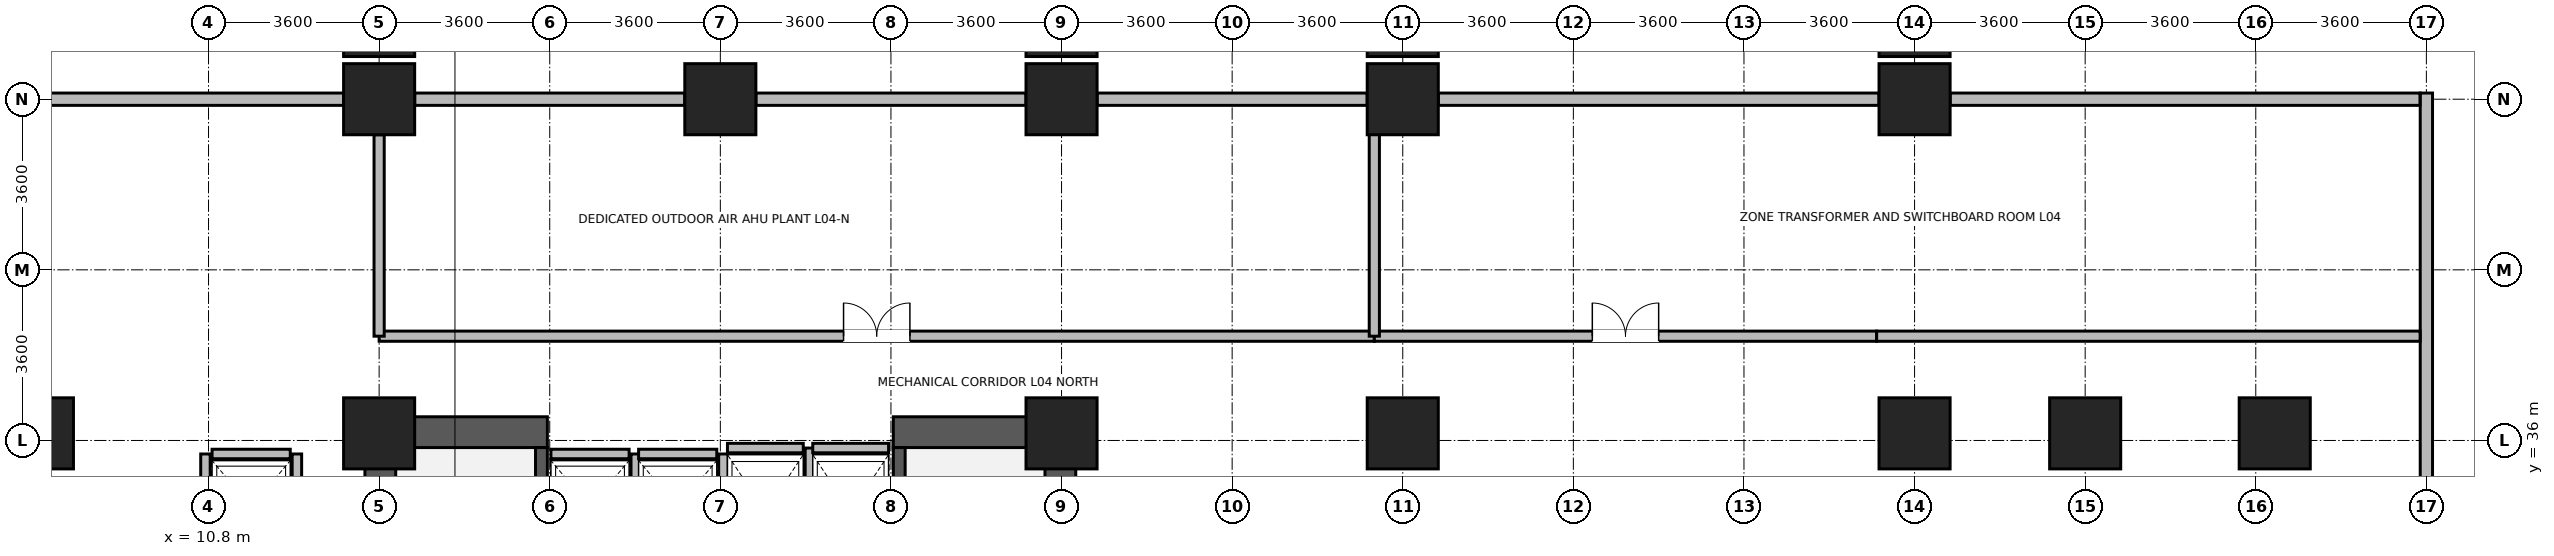
"""IFC4 building model, lengths in metres.
Left out: names, types, materials, properties, quantities, classifications, styles, units other than length and angle.
Written with IfcOpenShell. Run it as: python <this file> out.ifc"""

import sys

from ifc_helpers import new_model, si_unit, direction, frame, frame_2d, origin, origin_2d, place, context, subcontext, project, spatial, rectangle, extrude, source, transform, mapped, element, fill, save


model = new_model("IFC4")
c1 = context("Model", 3, precision=1e-05, world=origin(), true_north=direction((0.0, 1.0)))
c2 = subcontext(c1, "Body", "Model", "MODEL_VIEW")
j1 = project(units=[si_unit("LENGTHUNIT", "METRE"), si_unit("PLANEANGLEUNIT", "RADIAN")], contexts=[c1])
p1 = place(None, origin())
s1 = spatial("IfcSite", under=j1, at=p1, CompositionType="ELEMENT")
p2 = place(p1, origin())
s2 = spatial("IfcBuilding", under=s1, at=p2, CompositionType="ELEMENT")
p3 = place(p2, frame((0.0, 0.0, 19.8)))
s3 = spatial("IfcBuildingStorey", under=s2, at=p3, CompositionType="ELEMENT", Elevation=19.8)
for number, where, z_axis, x_axis in (
    (1, (14.425, 28.2, 0.0), (0.0, 0.0, 1.0), (0.0, 1.0, 0.0)),
    (2, (28.775, 28.2, 0.0), (0.0, 0.0, 1.0), (0.0, 1.0, 0.0)),
):
    element("IfcWall", number, at=place(p3, frame(where, z_axis=z_axis, x_axis=x_axis)), inside=s3, PredefinedType="SHEAR", context=c2, shape_type="SweptSolid", body=[
        extrude(rectangle(XDim=8.3, YDim=0.65, at=frame_2d((4.15, 0.0))), origin(), (0.0, 0.0, 1.0), 5.08),
    ])
for number, where, z_axis, x_axis in (
    (3, (14.75, 36.175, 0.0), (0.0, 0.0, 1.0), (1.0, 0.0, 0.0)),
    (4, (25.25, 36.175, 0.0), (0.0, 0.0, 1.0), (1.0, 0.0, 0.0)),
):
    element("IfcWall", number, at=place(p3, frame(where, z_axis=z_axis, x_axis=x_axis)), inside=s3, PredefinedType="SHEAR", context=c2, shape_type="SweptSolid", body=[
        extrude(rectangle(XDim=3.2, YDim=0.65, at=frame_2d((1.6, 0.0))), origin(), (0.0, 0.0, 1.0), 5.08),
    ])
p4 = place(p3, frame((17.825, 28.85, 0.0), z_axis=(0.0, 0.0, 1.0), x_axis=(0.0, 1.0, 0.0)))
e5 = element("IfcWall", 5, at=p4, inside=s3, PredefinedType="SHEAR", context=c2, shape_type="SweptSolid", body=[
    extrude(rectangle(XDim=7.0, YDim=0.25, at=frame_2d((3.5, 0.0))), origin(), (0.0, 0.0, 1.0), 5.08),
])
p5 = place(p4, frame((0.15, 0.0, 0.0)))
e6 = element("IfcOpeningElement", 6, at=p5, cuts=e5, PredefinedType="OPENING", context=c2, shape_type="SweptSolid", body=[
    extrude(rectangle(XDim=1.1, YDim=2.08, at=frame_2d((0.55, 1.04))), frame((0.0, 0.135, 0.0), z_axis=(0.0, -1.0, 0.0), x_axis=(1.0, 0.0, 0.0)), (0.0, 0.0, 1.0), 0.27),
])
p6 = place(p3, frame((25.375, 28.85, 0.0), z_axis=(0.0, 0.0, 1.0), x_axis=(0.0, 1.0, 0.0)))
e7 = element("IfcWall", 7, at=p6, inside=s3, PredefinedType="SHEAR", context=c2, shape_type="SweptSolid", body=[
    extrude(rectangle(XDim=7.0, YDim=0.25, at=frame_2d((3.5, 0.0))), origin(), (0.0, 0.0, 1.0), 5.08),
])
p7 = place(p6, frame((0.15, 0.0, 0.0)))
e8 = element("IfcOpeningElement", 8, at=p7, cuts=e7, PredefinedType="OPENING", context=c2, shape_type="SweptSolid", body=[
    extrude(rectangle(XDim=1.1, YDim=2.08, at=frame_2d((0.55, 1.04))), frame((0.0, 0.135, 0.0), z_axis=(0.0, -1.0, 0.0), x_axis=(1.0, 0.0, 0.0)), (0.0, 0.0, 1.0), 0.27),
])
m1 = source(origin(), c2, "Body", "SweptSolid", [
    extrude(rectangle(XDim=1.5, YDim=1.5, at=origin_2d()), origin(), (0.0, 0.0, 1.0), 5.5),
])
for number, where, z_axis, x_axis in (
    (9, (7.2, 36.15, 0.0), (0.0, 0.0, 1.0), (1.0, 0.0, 0.0)),
    (10, (14.4, 36.15, 0.0), (0.0, 0.0, 1.0), (1.0, 0.0, 0.0)),
    (11, (14.4, 43.2, 0.0), (0.0, 0.0, 1.0), (1.0, 0.0, 0.0)),
    (12, (21.6, 43.2, 0.0), (0.0, 0.0, 1.0), (1.0, 0.0, 0.0)),
    (13, (28.8, 36.15, 0.0), (0.0, 0.0, 1.0), (1.0, 0.0, 0.0)),
    (14, (28.8, 43.2, 0.0), (0.0, 0.0, 1.0), (1.0, 0.0, 0.0)),
    (15, (36.0, 43.2, 0.0), (0.0, 0.0, 1.0), (1.0, 0.0, 0.0)),
    (16, (36.0, 36.15, 0.0), (0.0, 0.0, 1.0), (1.0, 0.0, 0.0)),
    (17, (46.8, 36.15, 0.0), (0.0, 0.0, 1.0), (1.0, 0.0, 0.0)),
    (18, (46.8, 43.2, 0.0), (0.0, 0.0, 1.0), (1.0, 0.0, 0.0)),
    (19, (50.4, 36.15, 0.0), (0.0, 0.0, 1.0), (1.0, 0.0, 0.0)),
    (20, (54.4, 36.15, 0.0), (0.0, 0.0, 1.0), (1.0, 0.0, 0.0)),
    (21, (14.4, 44.85, 0.0), (0.0, 0.0, 1.0), (1.0, 0.0, 0.0)),
    (22, (28.8, 44.85, 0.0), (0.0, 0.0, 1.0), (1.0, 0.0, 0.0)),
    (23, (36.0, 44.85, 0.0), (0.0, 0.0, 1.0), (1.0, 0.0, 0.0)),
    (24, (46.8, 44.85, 0.0), (0.0, 0.0, 1.0), (1.0, 0.0, 0.0)),
):
    element("IfcColumn", number, at=place(p3, frame(where, z_axis=z_axis, x_axis=x_axis)), inside=s3, PredefinedType="COLUMN", context=c2, shape_type="MappedRepresentation", body=[
        mapped(m1, transform((0.0, 0.0, 0.0), x_axis=(1.0, 0.0, 0.0), y_axis=(0.0, 1.0, 0.0), z_axis=(0.0, 0.0, 1.0), scale=1.0)),
    ])
p8 = place(p3, frame((57.6, 43.33, 0.0), z_axis=(0.0, 0.0, 1.0), x_axis=(0.0, -1.0, 0.0)))
e25 = element("IfcWall", 25, at=p8, inside=s3, PredefinedType="STANDARD", context=c2, shape_type="SweptSolid", body=[
    extrude(rectangle(XDim=41.66, YDim=0.26, at=frame_2d((20.83, 0.0))), origin(), (0.0, 0.0, 1.0), 5.06),
])
p9 = place(p3, frame((47.551, 43.2, 0.0), z_axis=(0.0, 0.0, 1.0), x_axis=(1.0, 0.0, 0.0)))
e26 = element("IfcWall", 26, at=p9, inside=s3, PredefinedType="STANDARD", context=c2, shape_type="SweptSolid", body=[
    extrude(rectangle(XDim=9.914, YDim=0.26, at=frame_2d((4.957, 0.0))), origin(), (0.0, 0.0, 1.0), 5.06),
])
p10 = place(p3, frame((36.751, 43.2, 0.0), z_axis=(0.0, 0.0, 1.0), x_axis=(1.0, 0.0, 0.0)))
e27 = element("IfcWall", 27, at=p10, inside=s3, PredefinedType="STANDARD", context=c2, shape_type="SweptSolid", body=[
    extrude(rectangle(XDim=9.298, YDim=0.26, at=frame_2d((4.649, 0.0))), origin(), (0.0, 0.0, 1.0), 3.26),
])
for number, where, z_axis, x_axis in (
    (28, (29.551, 43.2, 0.0), (0.0, 0.0, 1.0), (1.0, 0.0, 0.0)),
    (29, (22.351, 43.2, 0.0), (0.0, 0.0, 1.0), (1.0, 0.0, 0.0)),
):
    element("IfcWall", number, at=place(p3, frame(where, z_axis=z_axis, x_axis=x_axis)), inside=s3, PredefinedType="STANDARD", context=c2, shape_type="SweptSolid", body=[
        extrude(rectangle(XDim=5.698, YDim=0.26, at=frame_2d((2.849, 0.0))), origin(), (0.0, 0.0, 1.0), 3.26),
    ])
p11 = place(p3, frame((15.151, 43.2, 0.0), z_axis=(0.0, 0.0, 1.0), x_axis=(1.0, 0.0, 0.0)))
e30 = element("IfcWall", 30, at=p11, inside=s3, PredefinedType="STANDARD", context=c2, shape_type="SweptSolid", body=[
    extrude(rectangle(XDim=5.698, YDim=0.26, at=frame_2d((2.849, 0.0))), origin(), (0.0, 0.0, 1.0), 3.26),
])
p12 = place(p3, frame((3.735, 43.2, 0.0), z_axis=(0.0, 0.0, 1.0), x_axis=(1.0, 0.0, 0.0)))
e31 = element("IfcWall", 31, at=p12, inside=s3, PredefinedType="STANDARD", context=c2, shape_type="SweptSolid", body=[
    extrude(rectangle(XDim=9.914, YDim=0.26, at=frame_2d((4.957, 0.0))), origin(), (0.0, 0.0, 1.0), 5.06),
])
p13 = place(p3, frame((18.025, 35.715, 0.0), z_axis=(0.0, 0.0, 1.0), x_axis=(1.0, 0.0, 0.0)))
e32 = element("IfcWall", 32, at=p13, inside=s3, PredefinedType="PARTITIONING", context=c2, shape_type="SweptSolid", body=[
    extrude(rectangle(XDim=1.65, YDim=0.2, at=frame_2d((0.825, 0.0))), origin(), (0.0, 0.0, 1.0), 5.06),
])
p14 = place(p3, frame((19.815, 33.485, 0.0), z_axis=(0.0, 0.0, 1.0), x_axis=(0.0, 1.0, 0.0)))
e33 = element("IfcWall", 33, at=p14, inside=s3, PredefinedType="PARTITIONING", context=c2, shape_type="SweptSolid", body=[
    extrude(rectangle(XDim=2.23, YDim=0.2, at=frame_2d((1.115, 0.0))), origin(), (0.0, 0.0, 1.0), 5.06),
])
p15 = place(p3, frame((19.875, 35.715, 0.0), z_axis=(0.0, 0.0, 1.0), x_axis=(1.0, 0.0, 0.0)))
e34 = element("IfcWall", 34, at=p15, inside=s3, PredefinedType="PARTITIONING", context=c2, shape_type="SweptSolid", body=[
    extrude(rectangle(XDim=1.65, YDim=0.2, at=frame_2d((0.825, 0.0))), origin(), (0.0, 0.0, 1.0), 5.06),
])
p16 = place(p3, frame((21.665, 33.485, 0.0), z_axis=(0.0, 0.0, 1.0), x_axis=(0.0, 1.0, 0.0)))
e35 = element("IfcWall", 35, at=p16, inside=s3, PredefinedType="PARTITIONING", context=c2, shape_type="SweptSolid", body=[
    extrude(rectangle(XDim=2.23, YDim=0.2, at=frame_2d((1.115, 0.0))), origin(), (0.0, 0.0, 1.0), 5.06),
])
p17 = place(p3, frame((10.875, 35.715, 0.0), z_axis=(0.0, 0.0, 1.0), x_axis=(1.0, 0.0, 0.0)))
e36 = element("IfcWall", 36, at=p17, inside=s3, PredefinedType="PARTITIONING", context=c2, shape_type="SweptSolid", body=[
    extrude(rectangle(XDim=1.65, YDim=0.2, at=frame_2d((0.825, 0.0))), origin(), (0.0, 0.0, 1.0), 5.06),
])
for number, where, z_axis, x_axis in (
    (37, (10.735, 33.485, 0.0), (0.0, 0.0, 1.0), (0.0, 1.0, 0.0)),
    (38, (12.665, 33.485, 0.0), (0.0, 0.0, 1.0), (0.0, 1.0, 0.0)),
):
    element("IfcWall", number, at=place(p3, frame(where, z_axis=z_axis, x_axis=x_axis)), inside=s3, PredefinedType="PARTITIONING", context=c2, shape_type="SweptSolid", body=[
        extrude(rectangle(XDim=2.23, YDim=0.2, at=frame_2d((1.115, 0.0))), origin(), (0.0, 0.0, 1.0), 5.06),
    ])
p18 = place(p3, frame((21.75, 35.84, 0.0), z_axis=(0.0, 0.0, 1.0), x_axis=(1.0, 0.0, 0.0)))
e39 = element("IfcWall", 39, at=p18, inside=s3, PredefinedType="PARTITIONING", context=c2, shape_type="SweptSolid", body=[
    extrude(rectangle(XDim=1.6, YDim=0.2, at=frame_2d((0.8, 0.0))), origin(), (0.0, 0.0, 1.0), 3.86),
])
p19 = place(p3, frame((23.49, 33.16, 0.0), z_axis=(0.0, 0.0, 1.0), x_axis=(0.0, 1.0, 0.0)))
e40 = element("IfcWall", 40, at=p19, inside=s3, PredefinedType="PARTITIONING", context=c2, shape_type="SweptSolid", body=[
    extrude(rectangle(XDim=2.68, YDim=0.2, at=frame_2d((1.34, 0.0))), origin(), (0.0, 0.0, 1.0), 5.06),
])
p20 = place(p3, frame((23.55, 35.84, 0.0), z_axis=(0.0, 0.0, 1.0), x_axis=(1.0, 0.0, 0.0)))
e41 = element("IfcWall", 41, at=p20, inside=s3, PredefinedType="PARTITIONING", context=c2, shape_type="SweptSolid", body=[
    extrude(rectangle(XDim=1.6, YDim=0.2, at=frame_2d((0.8, 0.0))), origin(), (0.0, 0.0, 1.0), 3.86),
])
p21 = place(p3, frame((14.4, 38.2, 0.0), z_axis=(0.0, 0.0, 1.0), x_axis=(1.0, 0.0, 0.0)))
e42 = element("IfcWall", 42, at=p21, inside=s3, PredefinedType="PARTITIONING", context=c2, shape_type="SweptSolid", body=[
    extrude(rectangle(XDim=21.0, YDim=0.215, at=frame_2d((10.5, 0.0))), origin(), (0.0, 0.0, 1.0), 5.06),
])
p22 = place(p21, frame((9.8, 0.0, 0.0)))
e43 = element("IfcOpeningElement", 43, at=p22, cuts=e42, PredefinedType="OPENING", context=c2, shape_type="SweptSolid", body=[
    extrude(rectangle(XDim=1.4, YDim=2.15, at=frame_2d((0.7, 1.075))), frame((0.0, 0.118, 0.0), z_axis=(0.0, -1.0, 0.0), x_axis=(1.0, 0.0, 0.0)), (0.0, 0.0, 1.0), 0.235),
])
p23 = place(p3, frame((35.4, 38.2, 0.0), z_axis=(0.0, 0.0, 1.0), x_axis=(1.0, 0.0, 0.0)))
e44 = element("IfcWall", 44, at=p23, inside=s3, PredefinedType="PARTITIONING", context=c2, shape_type="SweptSolid", body=[
    extrude(rectangle(XDim=10.6, YDim=0.215, at=frame_2d((5.3, 0.0))), origin(), (0.0, 0.0, 1.0), 5.06),
])
p24 = place(p23, frame((4.6, 0.0, 0.0)))
e45 = element("IfcOpeningElement", 45, at=p24, cuts=e44, PredefinedType="OPENING", context=c2, shape_type="SweptSolid", body=[
    extrude(rectangle(XDim=1.4, YDim=2.15, at=frame_2d((0.7, 1.075))), frame((0.0, 0.118, 0.0), z_axis=(0.0, -1.0, 0.0), x_axis=(1.0, 0.0, 0.0)), (0.0, 0.0, 1.0), 0.235),
])
p25 = place(p3, frame((46.0, 38.2, 0.0), z_axis=(0.0, 0.0, 1.0), x_axis=(1.0, 0.0, 0.0)))
e46 = element("IfcWall", 46, at=p25, inside=s3, PredefinedType="PARTITIONING", context=c2, shape_type="SweptSolid", body=[
    extrude(rectangle(XDim=11.468, YDim=0.215, at=frame_2d((5.734, 0.0))), origin(), (0.0, 0.0, 1.0), 5.06),
])
p26 = place(p3, frame((14.4, 38.2, 0.0), z_axis=(0.0, 0.0, 1.0), x_axis=(0.0, 1.0, 0.0)))
e47 = element("IfcWall", 47, at=p26, inside=s3, PredefinedType="PARTITIONING", context=c2, shape_type="SweptSolid", body=[
    extrude(rectangle(XDim=4.25, YDim=0.215, at=frame_2d((2.125, 0.0))), origin(), (0.0, 0.0, 1.0), 5.06),
])
p27 = place(p3, frame((35.4, 38.2, 0.0), z_axis=(0.0, 0.0, 1.0), x_axis=(0.0, 1.0, 0.0)))
e48 = element("IfcWall", 48, at=p27, inside=s3, PredefinedType="PARTITIONING", context=c2, shape_type="SweptSolid", body=[
    extrude(rectangle(XDim=4.868, YDim=0.215, at=frame_2d((2.434, 0.0))), origin(), (0.0, 0.0, 1.0), 5.06),
])
p28 = place(p22, origin())
e49 = element("IfcDoor", 49, at=p28, inside=s3, OperationType="DOUBLE_DOOR_SINGLE_SWING", PredefinedType="DOOR", context=c2, shape_type="SweptSolid", body=[
    extrude(rectangle(XDim=1.4, YDim=2.15, at=frame_2d((0.7, 1.075))), frame((0.0, 0.025, 0.0), z_axis=(0.0, -1.0, 0.0), x_axis=(1.0, 0.0, 0.0)), (0.0, 0.0, 1.0), 0.05),
])
fill(e43, e49)
p29 = place(p24, origin())
e50 = element("IfcDoor", 50, at=p29, inside=s3, OperationType="DOUBLE_DOOR_SINGLE_SWING", PredefinedType="DOOR", context=c2, shape_type="SweptSolid", body=[
    extrude(rectangle(XDim=1.4, YDim=2.15, at=frame_2d((0.7, 1.075))), frame((0.0, 0.025, 0.0), z_axis=(0.0, -1.0, 0.0), x_axis=(1.0, 0.0, 0.0)), (0.0, 0.0, 1.0), 0.05),
])
fill(e45, e50)
save(model, sys.argv[1])
